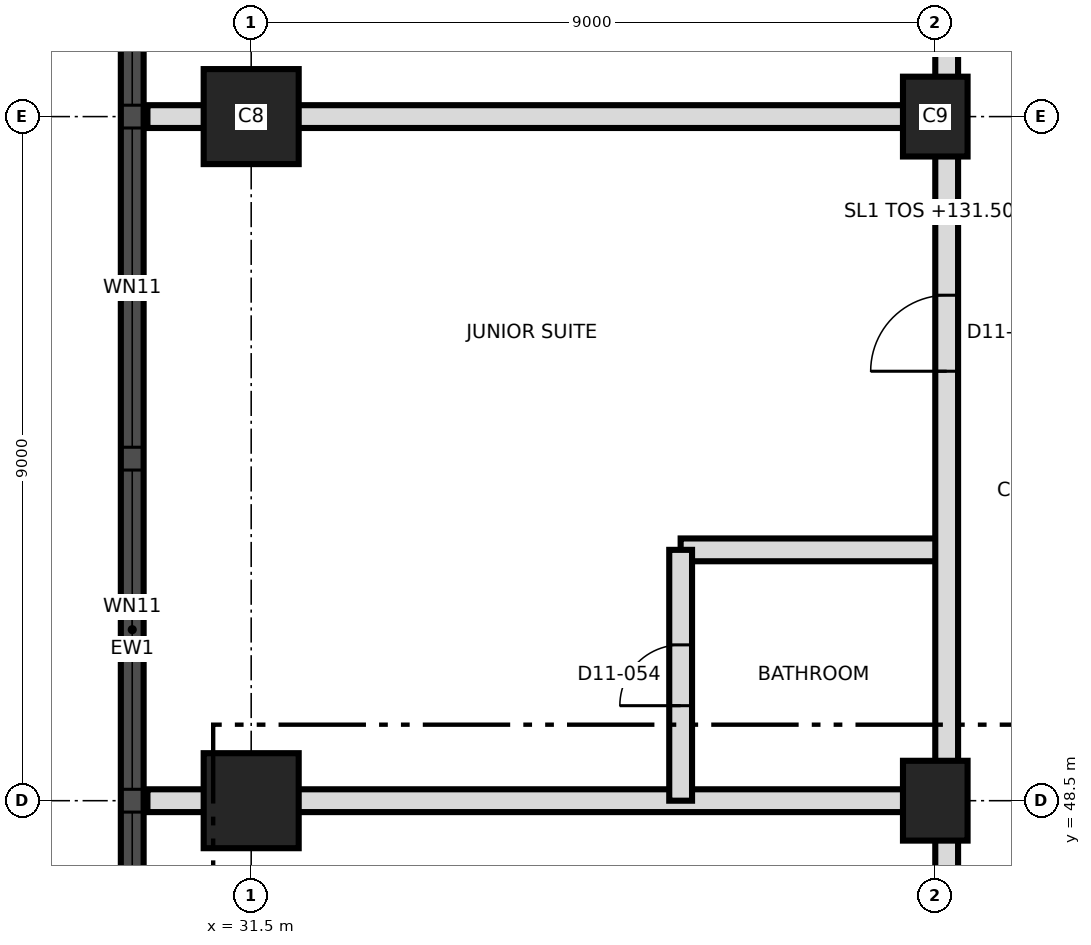
"""IFC4 building model, lengths in metres.
Left out: names, types, materials, properties, quantities, classifications, styles, units other than length and angle.
Written with IfcOpenShell. Run it as: python <this file> out.ifc"""

import sys

from ifc_helpers import new_model, si_unit, direction, frame, frame_2d, origin, origin_2d, place, context, subcontext, project, spatial, rectangle, extrude, element, fill, save


model = new_model("IFC4")
c1 = context("Model", 3, precision=1e-05, world=origin(), true_north=direction((0.0, 1.0)))
c2 = subcontext(c1, "Body", "Model", "MODEL_VIEW")
j1 = project(units=[si_unit("LENGTHUNIT", "METRE"), si_unit("PLANEANGLEUNIT", "RADIAN")], contexts=[c1])
p1 = place(None, origin())
s1 = spatial("IfcSite", under=j1, at=p1, CompositionType="ELEMENT")
p2 = place(p1, origin())
s2 = spatial("IfcBuilding", under=s1, at=p2, CompositionType="ELEMENT")
p3 = place(p2, frame((0.0, 0.0, 131.5)))
s3 = spatial("IfcBuildingStorey", under=s2, at=p3, CompositionType="ELEMENT", Elevation=131.5)
p4 = place(p3, frame((31.5, 48.5, 0.0), z_axis=(0.0, 0.0, 1.0), x_axis=(1.0, 0.0, 0.0)))
e1 = element("IfcColumn", 1, at=p4, inside=s3, PredefinedType="COLUMN", context=c2, shape_type="SweptSolid", body=[
    extrude(rectangle(XDim=1.25, YDim=1.25, at=origin_2d()), origin(), (0.0, 0.0, 1.0), 3.7),
])
p5 = place(p3, frame((40.5, 48.5, 0.0), z_axis=(0.0, 0.0, 1.0), x_axis=(0.0, 1.0, 0.0)))
e2 = element("IfcColumn", 2, at=p5, inside=s3, PredefinedType="COLUMN", context=c2, shape_type="SweptSolid", body=[
    extrude(rectangle(XDim=1.05, YDim=0.85, at=origin_2d()), origin(), (0.0, 0.0, 1.0), 3.7),
])
p6 = place(p3, frame((31.5, 57.5, 0.0), z_axis=(0.0, 0.0, 1.0), x_axis=(1.0, 0.0, 0.0)))
e3 = element("IfcColumn", 3, at=p6, inside=s3, PredefinedType="COLUMN", context=c2, shape_type="SweptSolid", body=[
    extrude(rectangle(XDim=1.25, YDim=1.25, at=origin_2d()), origin(), (0.0, 0.0, 1.0), 3.7),
])
p7 = place(p3, frame((40.5, 57.5, 0.0), z_axis=(0.0, 0.0, 1.0), x_axis=(0.0, 1.0, 0.0)))
e4 = element("IfcColumn", 4, at=p7, inside=s3, PredefinedType="COLUMN", context=c2, shape_type="SweptSolid", body=[
    extrude(rectangle(XDim=1.05, YDim=0.85, at=origin_2d()), origin(), (0.0, 0.0, 1.0), 3.7),
])
p8 = place(p3, frame((29.935, 66.986, 0.0), z_axis=(0.0, 0.0, 1.0), x_axis=(0.0, -1.0, 0.0)))
e5 = element("IfcWall", 5, at=p8, inside=s3, PredefinedType="SOLIDWALL", context=c2, shape_type="SweptSolid", body=[
    extrude(rectangle(XDim=32.976, YDim=0.3, at=frame_2d((16.488, 0.0))), origin(), (0.0, 0.0, 1.0), 3.4),
])
p9 = place(p8, frame((1.593, 0.0, 0.3)))
e6 = element("IfcOpeningElement", 6, at=p9, cuts=e5, PredefinedType="OPENING", context=c2, shape_type="SweptSolid", body=[
    extrude(rectangle(XDim=1.8, YDim=2.4, at=frame_2d((0.9, 1.2))), frame((0.0, 0.16, 0.0), z_axis=(0.0, -1.0, 0.0), x_axis=(1.0, 0.0, 0.0)), (0.0, 0.0, 1.0), 0.32),
])
p10 = place(p8, frame((5.136, 0.0, 0.9)))
e7 = element("IfcOpeningElement", 7, at=p10, cuts=e5, PredefinedType="OPENING", context=c2, shape_type="SweptSolid", body=[
    extrude(rectangle(XDim=4.2, YDim=1.5, at=frame_2d((2.1, 0.75))), frame((0.0, 0.16, 0.0), z_axis=(0.0, -1.0, 0.0), x_axis=(1.0, 0.0, 0.0)), (0.0, 0.0, 1.0), 0.32),
])
p11 = place(p8, frame((9.636, 0.0, 0.9)))
e8 = element("IfcOpeningElement", 8, at=p11, cuts=e5, PredefinedType="OPENING", context=c2, shape_type="SweptSolid", body=[
    extrude(rectangle(XDim=4.2, YDim=1.5, at=frame_2d((2.1, 0.75))), frame((0.0, 0.16, 0.0), z_axis=(0.0, -1.0, 0.0), x_axis=(1.0, 0.0, 0.0)), (0.0, 0.0, 1.0), 0.32),
])
p12 = place(p8, frame((14.136, 0.0, 0.9)))
e9 = element("IfcOpeningElement", 9, at=p12, cuts=e5, PredefinedType="OPENING", context=c2, shape_type="SweptSolid", body=[
    extrude(rectangle(XDim=4.2, YDim=1.5, at=frame_2d((2.1, 0.75))), frame((0.0, 0.16, 0.0), z_axis=(0.0, -1.0, 0.0), x_axis=(1.0, 0.0, 0.0)), (0.0, 0.0, 1.0), 0.32),
])
p13 = place(p8, frame((18.636, 0.0, 0.9)))
e10 = element("IfcOpeningElement", 10, at=p13, cuts=e5, PredefinedType="OPENING", context=c2, shape_type="SweptSolid", body=[
    extrude(rectangle(XDim=4.2, YDim=1.5, at=frame_2d((2.1, 0.75))), frame((0.0, 0.16, 0.0), z_axis=(0.0, -1.0, 0.0), x_axis=(1.0, 0.0, 0.0)), (0.0, 0.0, 1.0), 0.32),
])
p14 = place(p8, frame((23.136, 0.0, 0.9)))
e11 = element("IfcOpeningElement", 11, at=p14, cuts=e5, PredefinedType="OPENING", context=c2, shape_type="SweptSolid", body=[
    extrude(rectangle(XDim=4.2, YDim=1.5, at=frame_2d((2.1, 0.75))), frame((0.0, 0.16, 0.0), z_axis=(0.0, -1.0, 0.0), x_axis=(1.0, 0.0, 0.0)), (0.0, 0.0, 1.0), 0.32),
])
p15 = place(p8, frame((29.331, 0.0, 0.3)))
e12 = element("IfcOpeningElement", 12, at=p15, cuts=e5, PredefinedType="OPENING", context=c2, shape_type="SweptSolid", body=[
    extrude(rectangle(XDim=1.8, YDim=2.4, at=frame_2d((0.9, 1.2))), frame((0.0, 0.16, 0.0), z_axis=(0.0, -1.0, 0.0), x_axis=(1.0, 0.0, 0.0)), (0.0, 0.0, 1.0), 0.32),
])
p16 = place(p3, frame((30.135, 48.5, 0.0), z_axis=(0.0, 0.0, 1.0), x_axis=(1.0, 0.0, 0.0)))
e13 = element("IfcWall", 13, at=p16, inside=s3, PredefinedType="PARTITIONING", context=c2, shape_type="SweptSolid", body=[
    extrude(rectangle(XDim=10.515, YDim=0.3, at=frame_2d((5.257, 0.0))), origin(), (0.0, 0.0, 1.0), 3.35),
])
p17 = place(p3, frame((37.15, 51.8, 0.0), z_axis=(0.0, 0.0, 1.0), x_axis=(1.0, 0.0, 0.0)))
e14 = element("IfcWall", 14, at=p17, inside=s3, PredefinedType="PARTITIONING", context=c2, shape_type="SweptSolid", body=[
    extrude(rectangle(XDim=3.5, YDim=0.3, at=frame_2d((1.75, 0.0))), origin(), (0.0, 0.0, 1.0), 3.4),
])
p18 = place(p3, frame((30.135, 57.5, 0.0), z_axis=(0.0, 0.0, 1.0), x_axis=(1.0, 0.0, 0.0)))
e15 = element("IfcWall", 15, at=p18, inside=s3, PredefinedType="PARTITIONING", context=c2, shape_type="SweptSolid", body=[
    extrude(rectangle(XDim=10.515, YDim=0.3, at=frame_2d((5.257, 0.0))), origin(), (0.0, 0.0, 1.0), 3.35),
])
p19 = place(p3, frame((37.15, 48.5, 0.0), z_axis=(0.0, 0.0, 1.0), x_axis=(0.0, 1.0, 0.0)))
e16 = element("IfcWall", 16, at=p19, inside=s3, PredefinedType="PARTITIONING", context=c2, shape_type="SweptSolid", body=[
    extrude(rectangle(XDim=3.3, YDim=0.3, at=frame_2d((1.65, 0.0))), origin(), (0.0, 0.0, 1.0), 3.4),
])
p20 = place(p19, frame((1.25, 0.0, 0.0)))
e17 = element("IfcOpeningElement", 17, at=p20, cuts=e16, PredefinedType="OPENING", context=c2, shape_type="SweptSolid", body=[
    extrude(rectangle(XDim=0.8, YDim=2.1, at=frame_2d((0.4, 1.05))), frame((0.0, 0.16, 0.0), z_axis=(0.0, -1.0, 0.0), x_axis=(1.0, 0.0, 0.0)), (0.0, 0.0, 1.0), 0.32),
])
p21 = place(p3, frame((40.65, 39.8, 0.0), z_axis=(0.0, 0.0, 1.0), x_axis=(0.0, 1.0, 0.0)))
e18 = element("IfcWall", 18, at=p21, inside=s3, PredefinedType="PARTITIONING", context=c2, shape_type="SweptSolid", body=[
    extrude(rectangle(XDim=37.305, YDim=0.3, at=frame_2d((18.652, 0.0))), origin(), (0.0, 0.0, 1.0), 3.35),
])
p22 = place(p21, frame((0.85, 0.0, 0.0)))
e19 = element("IfcOpeningElement", 19, at=p22, cuts=e18, PredefinedType="OPENING", context=c2, shape_type="SweptSolid", body=[
    extrude(rectangle(XDim=1.0, YDim=2.1, at=frame_2d((0.5, 1.05))), frame((0.0, 0.16, 0.0), z_axis=(0.0, -1.0, 0.0), x_axis=(1.0, 0.0, 0.0)), (0.0, 0.0, 1.0), 0.32),
])
p23 = place(p21, frame((6.7, 0.0, 0.0)))
e20 = element("IfcOpeningElement", 20, at=p23, cuts=e18, PredefinedType="OPENING", context=c2, shape_type="SweptSolid", body=[
    extrude(rectangle(XDim=1.0, YDim=2.1, at=frame_2d((0.5, 1.05))), frame((0.0, 0.16, 0.0), z_axis=(0.0, -1.0, 0.0), x_axis=(1.0, 0.0, 0.0)), (0.0, 0.0, 1.0), 0.32),
])
p24 = place(p21, frame((14.35, 0.0, 0.0)))
e21 = element("IfcOpeningElement", 21, at=p24, cuts=e18, PredefinedType="OPENING", context=c2, shape_type="SweptSolid", body=[
    extrude(rectangle(XDim=1.0, YDim=2.4, at=frame_2d((0.5, 1.2))), frame((0.0, 0.16, 0.0), z_axis=(0.0, -1.0, 0.0), x_axis=(1.0, 0.0, 0.0)), (0.0, 0.0, 1.0), 0.32),
])
p25 = place(p21, frame((21.2, 0.0, 0.0)))
e22 = element("IfcOpeningElement", 22, at=p25, cuts=e18, PredefinedType="OPENING", context=c2, shape_type="SweptSolid", body=[
    extrude(rectangle(XDim=1.0, YDim=2.4, at=frame_2d((0.5, 1.2))), frame((0.0, 0.16, 0.0), z_axis=(0.0, -1.0, 0.0), x_axis=(1.0, 0.0, 0.0)), (0.0, 0.0, 1.0), 0.32),
])
p26 = place(p10, origin())
e23 = element("IfcWindow", 23, at=p26, inside=s3, PartitioningType="SINGLE_PANEL", PredefinedType="WINDOW", context=c2, shape_type="SweptSolid", body=[
    extrude(rectangle(XDim=4.2, YDim=1.5, at=frame_2d((2.1, 0.75))), frame((0.0, 0.03, 0.0), z_axis=(0.0, -1.0, 0.0), x_axis=(1.0, 0.0, 0.0)), (0.0, 0.0, 1.0), 0.06),
])
fill(e7, e23)
p27 = place(p11, origin())
e24 = element("IfcWindow", 24, at=p27, inside=s3, PartitioningType="SINGLE_PANEL", PredefinedType="WINDOW", context=c2, shape_type="SweptSolid", body=[
    extrude(rectangle(XDim=4.2, YDim=1.5, at=frame_2d((2.1, 0.75))), frame((0.0, 0.03, 0.0), z_axis=(0.0, -1.0, 0.0), x_axis=(1.0, 0.0, 0.0)), (0.0, 0.0, 1.0), 0.06),
])
fill(e8, e24)
p28 = place(p12, origin())
e25 = element("IfcWindow", 25, at=p28, inside=s3, PartitioningType="SINGLE_PANEL", PredefinedType="WINDOW", context=c2, shape_type="SweptSolid", body=[
    extrude(rectangle(XDim=4.2, YDim=1.5, at=frame_2d((2.1, 0.75))), frame((0.0, 0.03, 0.0), z_axis=(0.0, -1.0, 0.0), x_axis=(1.0, 0.0, 0.0)), (0.0, 0.0, 1.0), 0.06),
])
fill(e9, e25)
p29 = place(p13, origin())
e26 = element("IfcWindow", 26, at=p29, inside=s3, PartitioningType="SINGLE_PANEL", PredefinedType="WINDOW", context=c2, shape_type="SweptSolid", body=[
    extrude(rectangle(XDim=4.2, YDim=1.5, at=frame_2d((2.1, 0.75))), frame((0.0, 0.03, 0.0), z_axis=(0.0, -1.0, 0.0), x_axis=(1.0, 0.0, 0.0)), (0.0, 0.0, 1.0), 0.06),
])
fill(e10, e26)
p30 = place(p20, origin())
e27 = element("IfcDoor", 27, at=p30, inside=s3, OperationType="SINGLE_SWING_LEFT", PredefinedType="DOOR", context=c2, shape_type="SweptSolid", body=[
    extrude(rectangle(XDim=0.8, YDim=2.1, at=frame_2d((0.4, 1.05))), frame((0.0, 0.025, 0.0), z_axis=(0.0, -1.0, 0.0), x_axis=(1.0, 0.0, 0.0)), (0.0, 0.0, 1.0), 0.05),
])
fill(e17, e27)
p31 = place(p24, origin())
e28 = element("IfcDoor", 28, at=p31, inside=s3, OperationType="SINGLE_SWING_LEFT", PredefinedType="DOOR", context=c2, shape_type="SweptSolid", body=[
    extrude(rectangle(XDim=1.0, YDim=2.4, at=frame_2d((0.5, 1.2))), frame((0.0, 0.025, 0.0), z_axis=(0.0, -1.0, 0.0), x_axis=(1.0, 0.0, 0.0)), (0.0, 0.0, 1.0), 0.05),
])
fill(e21, e28)
save(model, sys.argv[1])
